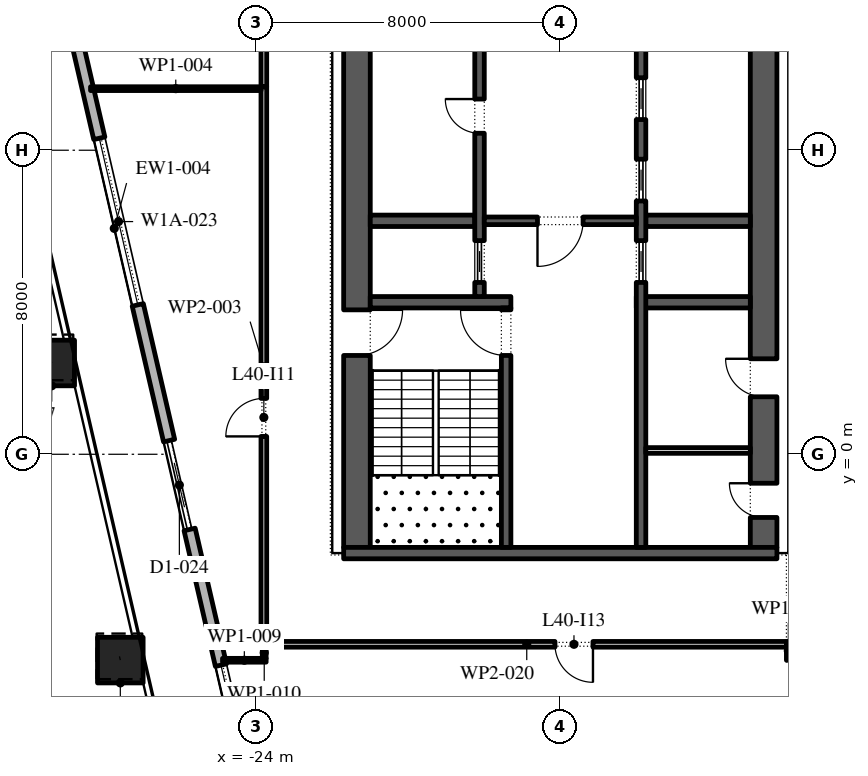
"""IFC4 building model, lengths in metres.
Left out: names, types, materials, properties, quantities, classifications, styles, units other than length and angle.
Written with IfcOpenShell. Run it as: python <this file> out.ifc"""

import sys

from ifc_helpers import new_model, si_unit, direction, frame, frame_2d, origin, origin_2d, place, context, subcontext, project, spatial, rectangle, extrude, element, fill, save


model = new_model("IFC4")
c1 = context("Model", 3, precision=1e-05, world=origin(), true_north=direction((0.0, 1.0)))
c2 = subcontext(c1, "Body", "Model", "MODEL_VIEW")
j1 = project(units=[si_unit("LENGTHUNIT", "METRE"), si_unit("PLANEANGLEUNIT", "RADIAN")], contexts=[c1])
p1 = place(None, origin())
s1 = spatial("IfcSite", under=j1, at=p1, CompositionType="ELEMENT")
p2 = place(p1, origin())
s2 = spatial("IfcBuilding", under=s1, at=p2, CompositionType="ELEMENT")
p3 = place(p2, frame((0.0, 0.0, 184.2)))
s3 = spatial("IfcBuildingStorey", under=s2, at=p3, CompositionType="ELEMENT", Elevation=184.2)
p4 = place(p3, frame((-29.381, 2.402, 0.0), z_axis=(-0.0080747472, 0.035087390713, 0.999351626541), x_axis=(-0.974526982896, -0.224270282488, 0.0)))
e1 = element("IfcColumn", 1, at=p4, inside=s3, PredefinedType="COLUMN", context=c2, shape_type="SweptSolid", body=[
    extrude(rectangle(XDim=1.2, YDim=1.2, at=origin_2d()), origin(), (0.0, 0.0, 1.0), 4.203),
])
p5 = place(p3, frame((-27.577, -5.416, 0.0), z_axis=(-0.005404472139, 0.023419379268, 0.999711120452), x_axis=(-0.974391195695, -0.224859506699, 0.0)))
e2 = element("IfcColumn", 2, at=p5, inside=s3, PredefinedType="COLUMN", context=c2, shape_type="SweptSolid", body=[
    extrude(rectangle(XDim=1.2, YDim=1.2, at=origin_2d()), origin(), (0.0, 0.0, 1.0), 4.201),
])
p6 = place(p3, frame((-33.157, 30.092, 0.0), z_axis=(0.0, 0.0, 1.0), x_axis=(0.224950279389, -0.974370243697, 0.0)))
e3 = element("IfcWall", 3, at=p6, inside=s3, PredefinedType="STANDARD", context=c2, shape_type="SweptSolid", body=[
    extrude(rectangle(XDim=49.5, YDim=0.3, at=frame_2d((24.75, 0.0))), origin(), (0.0, 0.0, 1.0), 4.0),
])
p7 = place(p6, frame((2.207, 0.0, 0.0)))
e4 = element("IfcOpeningElement", 4, at=p7, cuts=e3, PredefinedType="OPENING", context=c2, shape_type="SweptSolid", body=[
    extrude(rectangle(XDim=2.4, YDim=3.5, at=frame_2d((1.2, 1.75))), frame((0.0, 0.16, 0.0), z_axis=(0.0, -1.0, 0.0), x_axis=(1.0, 0.0, 0.0)), (0.0, 0.0, 1.0), 0.32),
])
p8 = place(p6, frame((8.121, 0.0, 0.45)))
e5 = element("IfcOpeningElement", 5, at=p8, cuts=e3, PredefinedType="OPENING", context=c2, shape_type="SweptSolid", body=[
    extrude(rectangle(XDim=4.5, YDim=2.825, at=frame_2d((2.25, 1.413))), frame((0.0, 0.16, 0.0), z_axis=(0.0, -1.0, 0.0), x_axis=(1.0, 0.0, 0.0)), (0.0, 0.0, 1.0), 0.32),
])
p9 = place(p6, frame((15.236, 0.0, 0.45)))
e6 = element("IfcOpeningElement", 6, at=p9, cuts=e3, PredefinedType="OPENING", context=c2, shape_type="SweptSolid", body=[
    extrude(rectangle(XDim=4.5, YDim=2.95, at=frame_2d((2.25, 1.475))), frame((0.0, 0.16, 0.0), z_axis=(0.0, -1.0, 0.0), x_axis=(1.0, 0.0, 0.0)), (0.0, 0.0, 1.0), 0.32),
])
p10 = place(p6, frame((22.35, 0.0, 0.45)))
e7 = element("IfcOpeningElement", 7, at=p10, cuts=e3, PredefinedType="OPENING", context=c2, shape_type="SweptSolid", body=[
    extrude(rectangle(XDim=4.5, YDim=3.0, at=frame_2d((2.25, 1.5))), frame((0.0, 0.16, 0.0), z_axis=(0.0, -1.0, 0.0), x_axis=(1.0, 0.0, 0.0)), (0.0, 0.0, 1.0), 0.32),
])
p11 = place(p6, frame((30.514, 0.0, 0.0)))
e8 = element("IfcOpeningElement", 8, at=p11, cuts=e3, PredefinedType="OPENING", context=c2, shape_type="SweptSolid", body=[
    extrude(rectangle(XDim=2.4, YDim=3.5, at=frame_2d((1.2, 1.75))), frame((0.0, 0.16, 0.0), z_axis=(0.0, -1.0, 0.0), x_axis=(1.0, 0.0, 0.0)), (0.0, 0.0, 1.0), 0.32),
])
p12 = place(p6, frame((36.579, 0.0, 0.45)))
e9 = element("IfcOpeningElement", 9, at=p12, cuts=e3, PredefinedType="OPENING", context=c2, shape_type="SweptSolid", body=[
    extrude(rectangle(XDim=4.5, YDim=3.05, at=frame_2d((2.25, 1.525))), frame((0.0, 0.16, 0.0), z_axis=(0.0, -1.0, 0.0), x_axis=(1.0, 0.0, 0.0)), (0.0, 0.0, 1.0), 0.32),
])
p13 = place(p6, frame((43.693, 0.0, 0.45)))
e10 = element("IfcOpeningElement", 10, at=p13, cuts=e3, PredefinedType="OPENING", context=c2, shape_type="SweptSolid", body=[
    extrude(rectangle(XDim=4.5, YDim=3.05, at=frame_2d((2.25, 1.525))), frame((0.0, 0.16, 0.0), z_axis=(0.0, -1.0, 0.0), x_axis=(1.0, 0.0, 0.0)), (0.0, 0.0, 1.0), 0.32),
])
p14 = place(p3, frame((-21.35, -2.45, 0.0), z_axis=(0.0, 0.0, 1.0), x_axis=(0.0, 1.0, 0.0)))
e11 = element("IfcWall", 11, at=p14, inside=s3, PredefinedType="SHEAR", context=c2, shape_type="SweptSolid", body=[
    extrude(rectangle(XDim=27.9, YDim=0.7, at=frame_2d((13.95, 0.0))), origin(), (0.0, 0.0, 1.0), 4.0),
])
p15 = place(p14, frame((5.05, 0.0, 0.0)))
e12 = element("IfcOpeningElement", 12, at=p15, cuts=e11, PredefinedType="OPENING", context=c2, shape_type="SweptSolid", body=[
    extrude(rectangle(XDim=1.2, YDim=2.1, at=frame_2d((0.6, 1.05))), frame((0.0, 0.36, 0.0), z_axis=(0.0, -1.0, 0.0), x_axis=(1.0, 0.0, 0.0)), (0.0, 0.0, 1.0), 0.72),
])
p16 = place(p14, frame((21.65, 0.0, 0.0)))
e13 = element("IfcOpeningElement", 13, at=p16, cuts=e11, PredefinedType="OPENING", context=c2, shape_type="SweptSolid", body=[
    extrude(rectangle(XDim=1.2, YDim=2.1, at=frame_2d((0.6, 1.05))), frame((0.0, 0.36, 0.0), z_axis=(0.0, -1.0, 0.0), x_axis=(1.0, 0.0, 0.0)), (0.0, 0.0, 1.0), 0.72),
])
p17 = place(p3, frame((-10.65, -2.45, 0.0), z_axis=(0.0, 0.0, 1.0), x_axis=(0.0, 1.0, 0.0)))
e14 = element("IfcWall", 14, at=p17, inside=s3, PredefinedType="SHEAR", context=c2, shape_type="SweptSolid", body=[
    extrude(rectangle(XDim=27.9, YDim=0.7, at=frame_2d((13.95, 0.0))), origin(), (0.0, 0.0, 1.0), 4.0),
])
p18 = place(p17, frame((23.65, 0.0, 0.0)))
e15 = element("IfcOpeningElement", 15, at=p18, cuts=e14, PredefinedType="OPENING", context=c2, shape_type="SweptSolid", body=[
    extrude(rectangle(XDim=2.4, YDim=2.1, at=frame_2d((1.2, 1.05))), frame((0.0, 0.36, 0.0), z_axis=(0.0, -1.0, 0.0), x_axis=(1.0, 0.0, 0.0)), (0.0, 0.0, 1.0), 0.72),
])
p19 = place(p17, frame((0.788, 0.0, 0.0)))
e16 = element("IfcOpeningElement", 16, at=p19, cuts=e14, PredefinedType="OPENING", context=c2, shape_type="SweptSolid", body=[
    extrude(rectangle(XDim=0.9, YDim=2.1, at=frame_2d((0.45, 1.05))), frame((0.0, 0.36, 0.0), z_axis=(0.0, -1.0, 0.0), x_axis=(1.0, 0.0, 0.0)), (0.0, 0.0, 1.0), 0.72),
])
p20 = place(p17, frame((3.962, 0.0, 0.0)))
e17 = element("IfcOpeningElement", 17, at=p20, cuts=e14, PredefinedType="OPENING", context=c2, shape_type="SweptSolid", body=[
    extrude(rectangle(XDim=1.0, YDim=2.1, at=frame_2d((0.5, 1.05))), frame((0.0, 0.36, 0.0), z_axis=(0.0, -1.0, 0.0), x_axis=(1.0, 0.0, 0.0)), (0.0, 0.0, 1.0), 0.72),
])
p21 = place(p3, frame((-21.7, -2.6, 0.0), z_axis=(0.0, 0.0, 1.0), x_axis=(1.0, 0.0, 0.0)))
e18 = element("IfcWall", 18, at=p21, inside=s3, PredefinedType="SHEAR", context=c2, shape_type="SweptSolid", body=[
    extrude(rectangle(XDim=11.4, YDim=0.3, at=frame_2d((5.7, 0.0))), origin(), (0.0, 0.0, 1.0), 4.0),
])
p22 = place(p3, frame((-21.0, 4.0, 0.0), z_axis=(0.0, 0.0, 1.0), x_axis=(1.0, 0.0, 0.0)))
e19 = element("IfcWall", 19, at=p22, inside=s3, PredefinedType="SHEAR", context=c2, shape_type="SweptSolid", body=[
    extrude(rectangle(XDim=3.7, YDim=0.3, at=frame_2d((1.85, 0.0))), origin(), (0.0, 0.0, 1.0), 4.0),
])
p23 = place(p3, frame((-17.425, -2.45, 0.0), z_axis=(0.0, 0.0, 1.0), x_axis=(0.0, 1.0, 0.0)))
e20 = element("IfcWall", 20, at=p23, inside=s3, PredefinedType="SHEAR", context=c2, shape_type="SweptSolid", body=[
    extrude(rectangle(XDim=6.3, YDim=0.25, at=frame_2d((3.15, 0.0))), origin(), (0.0, 0.0, 1.0), 4.0),
])
p24 = place(p23, frame((5.05, 0.0, 0.0)))
e21 = element("IfcOpeningElement", 21, at=p24, cuts=e20, PredefinedType="OPENING", context=c2, shape_type="SweptSolid", body=[
    extrude(rectangle(XDim=1.2, YDim=2.1, at=frame_2d((0.6, 1.05))), frame((0.0, 0.135, 0.0), z_axis=(0.0, -1.0, 0.0), x_axis=(1.0, 0.0, 0.0)), (0.0, 0.0, 1.0), 0.27),
])
p25 = place(p3, frame((-21.0, 6.143, 0.0), z_axis=(0.0, 0.0, 1.0), x_axis=(1.0, 0.0, 0.0)))
e22 = element("IfcWall", 22, at=p25, inside=s3, PredefinedType="SHEAR", context=c2, shape_type="SweptSolid", body=[
    extrude(rectangle(XDim=2.75, YDim=0.3, at=frame_2d((1.375, 0.0))), origin(), (0.0, 0.0, 1.0), 4.0),
])
p26 = place(p3, frame((-18.125, 4.15, 0.0), z_axis=(0.0, 0.0, 1.0), x_axis=(0.0, 1.0, 0.0)))
e23 = element("IfcWall", 23, at=p26, inside=s3, PredefinedType="SHEAR", context=c2, shape_type="SweptSolid", body=[
    extrude(rectangle(XDim=14.7, YDim=0.25, at=frame_2d((7.35, 0.0))), origin(), (0.0, 0.0, 1.0), 4.0),
])
p27 = place(p26, frame((4.296, 0.0, 0.0)))
e24 = element("IfcOpeningElement", 24, at=p27, cuts=e23, PredefinedType="OPENING", context=c2, shape_type="SweptSolid", body=[
    extrude(rectangle(XDim=0.9, YDim=2.1, at=frame_2d((0.45, 1.05))), frame((0.0, 0.135, 0.0), z_axis=(0.0, -1.0, 0.0), x_axis=(1.0, 0.0, 0.0)), (0.0, 0.0, 1.0), 0.27),
])
p28 = place(p26, frame((9.504, 0.0, 0.0)))
e25 = element("IfcOpeningElement", 25, at=p28, cuts=e23, PredefinedType="OPENING", context=c2, shape_type="SweptSolid", body=[
    extrude(rectangle(XDim=0.9, YDim=2.1, at=frame_2d((0.45, 1.05))), frame((0.0, 0.135, 0.0), z_axis=(0.0, -1.0, 0.0), x_axis=(1.0, 0.0, 0.0)), (0.0, 0.0, 1.0), 0.27),
])
p29 = place(p26, frame((0.371, 0.0, 0.0)))
e26 = element("IfcOpeningElement", 26, at=p29, cuts=e23, PredefinedType="OPENING", context=c2, shape_type="SweptSolid", body=[
    extrude(rectangle(XDim=1.1, YDim=2.1, at=frame_2d((0.55, 1.05))), frame((0.0, 0.135, 0.0), z_axis=(0.0, -1.0, 0.0), x_axis=(1.0, 0.0, 0.0)), (0.0, 0.0, 1.0), 0.27),
])
p30 = place(p26, frame((13.229, 0.0, 0.0)))
e27 = element("IfcOpeningElement", 27, at=p30, cuts=e23, PredefinedType="OPENING", context=c2, shape_type="SweptSolid", body=[
    extrude(rectangle(XDim=1.1, YDim=2.1, at=frame_2d((0.55, 1.05))), frame((0.0, 0.135, 0.0), z_axis=(0.0, -1.0, 0.0), x_axis=(1.0, 0.0, 0.0)), (0.0, 0.0, 1.0), 0.27),
])
p31 = place(p3, frame((-14.0, 4.0, 0.0), z_axis=(0.0, 0.0, 1.0), x_axis=(1.0, 0.0, 0.0)))
e28 = element("IfcWall", 28, at=p31, inside=s3, PredefinedType="SHEAR", context=c2, shape_type="SweptSolid", body=[
    extrude(rectangle(XDim=3.0, YDim=0.3, at=frame_2d((1.5, 0.0))), origin(), (0.0, 0.0, 1.0), 4.0),
])
p32 = place(p3, frame((-13.75, 6.143, 0.0), z_axis=(0.0, 0.0, 1.0), x_axis=(1.0, 0.0, 0.0)))
e29 = element("IfcWall", 29, at=p32, inside=s3, PredefinedType="SHEAR", context=c2, shape_type="SweptSolid", body=[
    extrude(rectangle(XDim=2.75, YDim=0.3, at=frame_2d((1.375, 0.0))), origin(), (0.0, 0.0, 1.0), 4.0),
])
p33 = place(p3, frame((-13.875, -2.45, 0.0), z_axis=(0.0, 0.0, 1.0), x_axis=(0.0, 1.0, 0.0)))
e30 = element("IfcWall", 30, at=p33, inside=s3, PredefinedType="SHEAR", context=c2, shape_type="SweptSolid", body=[
    extrude(rectangle(XDim=21.3, YDim=0.25, at=frame_2d((10.65, 0.0))), origin(), (0.0, 0.0, 1.0), 4.0),
])
p34 = place(p33, frame((17.786, 0.0, 0.0)))
e31 = element("IfcOpeningElement", 31, at=p34, cuts=e30, PredefinedType="OPENING", context=c2, shape_type="SweptSolid", body=[
    extrude(rectangle(XDim=0.9, YDim=2.1, at=frame_2d((0.45, 1.05))), frame((0.0, 0.135, 0.0), z_axis=(0.0, -1.0, 0.0), x_axis=(1.0, 0.0, 0.0)), (0.0, 0.0, 1.0), 0.27),
])
p35 = place(p33, frame((6.971, 0.0, 0.0)))
e32 = element("IfcOpeningElement", 32, at=p35, cuts=e30, PredefinedType="OPENING", context=c2, shape_type="SweptSolid", body=[
    extrude(rectangle(XDim=1.1, YDim=2.1, at=frame_2d((0.55, 1.05))), frame((0.0, 0.135, 0.0), z_axis=(0.0, -1.0, 0.0), x_axis=(1.0, 0.0, 0.0)), (0.0, 0.0, 1.0), 0.27),
])
p36 = place(p33, frame((9.114, 0.0, 0.0)))
e33 = element("IfcOpeningElement", 33, at=p36, cuts=e30, PredefinedType="OPENING", context=c2, shape_type="SweptSolid", body=[
    extrude(rectangle(XDim=1.1, YDim=2.1, at=frame_2d((0.55, 1.05))), frame((0.0, 0.135, 0.0), z_axis=(0.0, -1.0, 0.0), x_axis=(1.0, 0.0, 0.0)), (0.0, 0.0, 1.0), 0.27),
])
p37 = place(p33, frame((11.257, 0.0, 0.0)))
e34 = element("IfcOpeningElement", 34, at=p37, cuts=e30, PredefinedType="OPENING", context=c2, shape_type="SweptSolid", body=[
    extrude(rectangle(XDim=1.1, YDim=2.1, at=frame_2d((0.55, 1.05))), frame((0.0, 0.135, 0.0), z_axis=(0.0, -1.0, 0.0), x_axis=(1.0, 0.0, 0.0)), (0.0, 0.0, 1.0), 0.27),
])
p38 = place(p33, frame((13.4, 0.0, 0.0)))
e35 = element("IfcOpeningElement", 35, at=p38, cuts=e30, PredefinedType="OPENING", context=c2, shape_type="SweptSolid", body=[
    extrude(rectangle(XDim=1.1, YDim=2.1, at=frame_2d((0.55, 1.05))), frame((0.0, 0.135, 0.0), z_axis=(0.0, -1.0, 0.0), x_axis=(1.0, 0.0, 0.0)), (0.0, 0.0, 1.0), 0.27),
])
p39 = place(p3, frame((-18.0, 6.143, 0.0), z_axis=(0.0, 0.0, 1.0), x_axis=(1.0, 0.0, 0.0)))
e36 = element("IfcWall", 36, at=p39, inside=s3, PredefinedType="SHEAR", context=c2, shape_type="SweptSolid", body=[
    extrude(rectangle(XDim=4.0, YDim=0.2, at=frame_2d((2.0, 0.0))), origin(), (0.0, 0.0, 1.0), 4.0),
])
p40 = place(p39, frame((1.4, 0.0, 0.0)))
e37 = element("IfcOpeningElement", 37, at=p40, cuts=e36, PredefinedType="OPENING", context=c2, shape_type="SweptSolid", body=[
    extrude(rectangle(XDim=1.2, YDim=2.1, at=frame_2d((0.6, 1.05))), frame((0.0, 0.11, 0.0), z_axis=(0.0, -1.0, 0.0), x_axis=(1.0, 0.0, 0.0)), (0.0, 0.0, 1.0), 0.22),
])
p41 = place(p3, frame((-13.75, 0.1, 0.0), z_axis=(0.0, 0.0, 1.0), x_axis=(1.0, 0.0, 0.0)))
e38 = element("IfcWall", 38, at=p41, inside=s3, PredefinedType="PARTITIONING", context=c2, shape_type="SweptSolid", body=[
    extrude(rectangle(XDim=2.75, YDim=0.15, at=frame_2d((1.375, 0.0))), origin(), (0.0, 0.0, 1.0), 4.0),
])
p42 = place(p3, frame((-23.8, -5.075, 0.0), z_axis=(0.0, 0.0, 1.0), x_axis=(0.0, 1.0, 0.0)))
e39 = element("IfcWall", 39, at=p42, inside=s3, PredefinedType="PARTITIONING", context=c2, shape_type="SweptSolid", body=[
    extrude(rectangle(XDim=14.745, YDim=0.15, at=frame_2d((7.373, 0.0))), origin(), (0.0, 0.0, 1.0), 4.0),
])
p43 = place(p42, frame((5.545, 0.0, 0.0)))
e40 = element("IfcOpeningElement", 40, at=p43, cuts=e39, PredefinedType="OPENING", context=c2, shape_type="SweptSolid", body=[
    extrude(rectangle(XDim=1.0, YDim=2.1, at=frame_2d((0.5, 1.05))), frame((0.0, 0.085, 0.0), z_axis=(0.0, -1.0, 0.0), x_axis=(1.0, 0.0, 0.0)), (0.0, 0.0, 1.0), 0.17),
])
p44 = place(p3, frame((-23.875, 9.62, 0.0), z_axis=(0.0, 0.0, 1.0), x_axis=(-1.0, 0.0, 0.0)))
e41 = element("IfcWall", 41, at=p44, inside=s3, PredefinedType="PARTITIONING", context=c2, shape_type="SweptSolid", body=[
    extrude(rectangle(XDim=4.485, YDim=0.1, at=frame_2d((2.243, 0.0))), origin(), (0.0, 0.0, 1.0), 4.0),
])
p45 = place(p3, frame((-23.8, 9.67, 0.0), z_axis=(0.0, 0.0, 1.0), x_axis=(0.0, 1.0, 0.0)))
e42 = element("IfcWall", 42, at=p45, inside=s3, PredefinedType="PARTITIONING", context=c2, shape_type="SweptSolid", body=[
    extrude(rectangle(XDim=6.83, YDim=0.15, at=frame_2d((3.415, 0.0))), origin(), (0.0, 0.0, 1.0), 4.0),
])
p46 = place(p45, frame((1.48, 0.0, 0.0)))
e43 = element("IfcOpeningElement", 43, at=p46, cuts=e42, PredefinedType="OPENING", context=c2, shape_type="SweptSolid", body=[
    extrude(rectangle(XDim=1.0, YDim=2.1, at=frame_2d((0.5, 1.05))), frame((0.0, 0.085, 0.0), z_axis=(0.0, -1.0, 0.0), x_axis=(1.0, 0.0, 0.0)), (0.0, 0.0, 1.0), 0.17),
])
p47 = place(p3, frame((-23.74, -5.42, 0.0), z_axis=(0.0, 0.0, 1.0), x_axis=(-1.0, 0.0, 0.0)))
e44 = element("IfcWall", 44, at=p47, inside=s3, PredefinedType="PARTITIONING", context=c2, shape_type="SweptSolid", body=[
    extrude(rectangle(XDim=1.147, YDim=0.1, at=frame_2d((0.573, 0.0))), origin(), (0.0, 0.0, 1.0), 4.0),
])
p48 = place(p3, frame((-23.79, -5.075, 0.0), z_axis=(0.0, 0.0, 1.0), x_axis=(0.0, -1.0, 0.0)))
e45 = element("IfcWall", 45, at=p48, inside=s3, PredefinedType="PARTITIONING", context=c2, shape_type="SweptSolid", body=[
    extrude(rectangle(XDim=0.295, YDim=0.1, at=frame_2d((0.147, 0.0))), origin(), (0.0, 0.0, 1.0), 4.0),
])
p49 = place(p3, frame((-10.0, -5.42, 0.0), z_axis=(0.0, 0.0, 1.0), x_axis=(0.0, 1.0, 0.0)))
e46 = element("IfcWall", 46, at=p49, inside=s3, PredefinedType="PARTITIONING", context=c2, shape_type="SweptSolid", body=[
    extrude(rectangle(XDim=0.495, YDim=0.1, at=frame_2d((0.248, 0.0))), origin(), (0.0, 0.0, 1.0), 4.0),
])
p50 = place(p3, frame((-10.05, -5.0, 0.0), z_axis=(0.0, 0.0, 1.0), x_axis=(-1.0, 0.0, 0.0)))
e47 = element("IfcWall", 47, at=p50, inside=s3, PredefinedType="PARTITIONING", context=c2, shape_type="SweptSolid", body=[
    extrude(rectangle(XDim=13.665, YDim=0.15, at=frame_2d((6.833, 0.0))), origin(), (0.0, 0.0, 1.0), 4.0),
])
p51 = place(p50, frame((5.09, 0.0, 0.0)))
e48 = element("IfcOpeningElement", 48, at=p51, cuts=e47, PredefinedType="OPENING", context=c2, shape_type="SweptSolid", body=[
    extrude(rectangle(XDim=1.0, YDim=2.1, at=frame_2d((0.5, 1.05))), frame((0.0, 0.085, 0.0), z_axis=(0.0, -1.0, 0.0), x_axis=(1.0, 0.0, 0.0)), (0.0, 0.0, 1.0), 0.17),
])
p52 = place(p10, origin())
e49 = element("IfcWindow", 49, at=p52, inside=s3, PartitioningType="DOUBLE_PANEL_VERTICAL", PredefinedType="WINDOW", context=c2, shape_type="SweptSolid", body=[
    extrude(rectangle(XDim=4.5, YDim=3.0, at=frame_2d((2.25, 1.5))), frame((0.0, 0.03, 0.0), z_axis=(0.0, -1.0, 0.0), x_axis=(1.0, 0.0, 0.0)), (0.0, 0.0, 1.0), 0.06),
])
fill(e7, e49)
p53 = place(p11, origin())
e50 = element("IfcDoor", 50, at=p53, inside=s3, OperationType="DOUBLE_DOOR_SLIDING", PredefinedType="DOOR", context=c2, shape_type="SweptSolid", body=[
    extrude(rectangle(XDim=2.4, YDim=3.5, at=frame_2d((1.2, 1.75))), frame((0.0, 0.025, 0.0), z_axis=(0.0, -1.0, 0.0), x_axis=(1.0, 0.0, 0.0)), (0.0, 0.0, 1.0), 0.05),
])
fill(e8, e50)
p54 = place(p12, origin())
e51 = element("IfcWindow", 51, at=p54, inside=s3, PartitioningType="DOUBLE_PANEL_VERTICAL", PredefinedType="WINDOW", context=c2, shape_type="SweptSolid", body=[
    extrude(rectangle(XDim=4.5, YDim=3.05, at=frame_2d((2.25, 1.525))), frame((0.0, 0.03, 0.0), z_axis=(0.0, -1.0, 0.0), x_axis=(1.0, 0.0, 0.0)), (0.0, 0.0, 1.0), 0.06),
])
fill(e9, e51)
p55 = place(p27, origin())
e52 = element("IfcDoor", 52, at=p55, inside=s3, OperationType="SINGLE_SWING_LEFT", PredefinedType="DOOR", context=c2, shape_type="SweptSolid", body=[
    extrude(rectangle(XDim=0.9, YDim=2.1, at=frame_2d((0.45, 1.05))), frame((0.0, 0.125, 0.0), z_axis=(0.0, -1.0, 0.0), x_axis=(1.0, 0.0, 0.0)), (0.0, 0.0, 1.0), 0.05),
])
fill(e24, e52)
p56 = place(p29, origin())
e53 = element("IfcDoor", 53, at=p56, inside=s3, OperationType="SLIDING_TO_LEFT", PredefinedType="DOOR", context=c2, shape_type="SweptSolid", body=[
    extrude(rectangle(XDim=1.1, YDim=2.1, at=frame_2d((0.55, 1.05))), frame((0.0, 0.025, 0.0), z_axis=(0.0, -1.0, 0.0), x_axis=(1.0, 0.0, 0.0)), (0.0, 0.0, 1.0), 0.05),
])
fill(e26, e53)
p57 = place(p35, origin())
e54 = element("IfcDoor", 54, at=p57, inside=s3, OperationType="SLIDING_TO_LEFT", PredefinedType="DOOR", context=c2, shape_type="SweptSolid", body=[
    extrude(rectangle(XDim=1.1, YDim=2.1, at=frame_2d((0.55, 1.05))), frame((0.0, 0.025, 0.0), z_axis=(0.0, -1.0, 0.0), x_axis=(1.0, 0.0, 0.0)), (0.0, 0.0, 1.0), 0.05),
])
fill(e32, e54)
p58 = place(p36, origin())
e55 = element("IfcDoor", 55, at=p58, inside=s3, OperationType="SLIDING_TO_LEFT", PredefinedType="DOOR", context=c2, shape_type="SweptSolid", body=[
    extrude(rectangle(XDim=1.1, YDim=2.1, at=frame_2d((0.55, 1.05))), frame((0.0, 0.025, 0.0), z_axis=(0.0, -1.0, 0.0), x_axis=(1.0, 0.0, 0.0)), (0.0, 0.0, 1.0), 0.05),
])
fill(e33, e55)
p59 = place(p37, origin())
e56 = element("IfcDoor", 56, at=p59, inside=s3, OperationType="SLIDING_TO_LEFT", PredefinedType="DOOR", context=c2, shape_type="SweptSolid", body=[
    extrude(rectangle(XDim=1.1, YDim=2.1, at=frame_2d((0.55, 1.05))), frame((0.0, 0.025, 0.0), z_axis=(0.0, -1.0, 0.0), x_axis=(1.0, 0.0, 0.0)), (0.0, 0.0, 1.0), 0.05),
])
fill(e34, e56)
p60 = place(p40, frame((1.2, 0.0, 0.0), z_axis=(0.0, 0.0, 1.0), x_axis=(-1.0, 0.0, 0.0)))
e57 = element("IfcDoor", 57, at=p60, inside=s3, OperationType="SINGLE_SWING_LEFT", PredefinedType="DOOR", context=c2, shape_type="SweptSolid", body=[
    extrude(rectangle(XDim=1.2, YDim=2.1, at=frame_2d((0.6, 1.05))), frame((0.0, 0.025, 0.0), z_axis=(0.0, -1.0, 0.0), x_axis=(1.0, 0.0, 0.0)), (0.0, 0.0, 1.0), 0.05),
])
fill(e37, e57)
p61 = place(p24, origin())
e58 = element("IfcDoor", 58, at=p61, inside=s3, OperationType="SINGLE_SWING_LEFT", PredefinedType="DOOR", context=c2, shape_type="SweptSolid", body=[
    extrude(rectangle(XDim=1.2, YDim=2.1, at=frame_2d((0.6, 1.05))), frame((0.0, 0.025, 0.0), z_axis=(0.0, -1.0, 0.0), x_axis=(1.0, 0.0, 0.0)), (0.0, 0.0, 1.0), 0.05),
])
fill(e21, e58)
p62 = place(p15, frame((1.2, 0.0, 0.0), z_axis=(0.0, 0.0, 1.0), x_axis=(-1.0, 0.0, 0.0)))
e59 = element("IfcDoor", 59, at=p62, inside=s3, OperationType="SINGLE_SWING_RIGHT", PredefinedType="DOOR", context=c2, shape_type="SweptSolid", body=[
    extrude(rectangle(XDim=1.2, YDim=2.1, at=frame_2d((0.6, 1.05))), frame((0.0, 0.025, 0.0), z_axis=(0.0, -1.0, 0.0), x_axis=(1.0, 0.0, 0.0)), (0.0, 0.0, 1.0), 0.05),
])
fill(e12, e59)
p63 = place(p19, origin())
e60 = element("IfcDoor", 60, at=p63, inside=s3, OperationType="SINGLE_SWING_LEFT", PredefinedType="DOOR", context=c2, shape_type="SweptSolid", body=[
    extrude(rectangle(XDim=0.9, YDim=2.1, at=frame_2d((0.45, 1.05))), frame((0.0, 0.35, 0.0), z_axis=(0.0, -1.0, 0.0), x_axis=(1.0, 0.0, 0.0)), (0.0, 0.0, 1.0), 0.05),
])
fill(e16, e60)
p64 = place(p20, origin())
e61 = element("IfcDoor", 61, at=p64, inside=s3, OperationType="SINGLE_SWING_LEFT", PredefinedType="DOOR", context=c2, shape_type="SweptSolid", body=[
    extrude(rectangle(XDim=1.0, YDim=2.1, at=frame_2d((0.5, 1.05))), frame((0.0, 0.35, 0.0), z_axis=(0.0, -1.0, 0.0), x_axis=(1.0, 0.0, 0.0)), (0.0, 0.0, 1.0), 0.05),
])
fill(e17, e61)
p65 = place(p43, origin())
e62 = element("IfcDoor", 62, at=p65, inside=s3, OperationType="SINGLE_SWING_RIGHT", PredefinedType="DOOR", context=c2, shape_type="SweptSolid", body=[
    extrude(rectangle(XDim=1.0, YDim=2.1, at=frame_2d((0.5, 1.05))), frame((0.0, 0.025, 0.0), z_axis=(0.0, -1.0, 0.0), x_axis=(1.0, 0.0, 0.0)), (0.0, 0.0, 1.0), 0.05),
])
fill(e40, e62)
p66 = place(p51, origin())
e63 = element("IfcDoor", 63, at=p66, inside=s3, OperationType="SINGLE_SWING_RIGHT", PredefinedType="DOOR", context=c2, shape_type="SweptSolid", body=[
    extrude(rectangle(XDim=1.0, YDim=2.1, at=frame_2d((0.5, 1.05))), frame((0.0, 0.025, 0.0), z_axis=(0.0, -1.0, 0.0), x_axis=(1.0, 0.0, 0.0)), (0.0, 0.0, 1.0), 0.05),
])
fill(e48, e63)
save(model, sys.argv[1])
